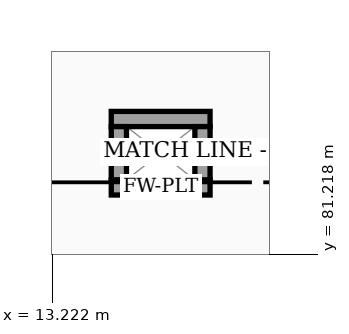
"""IFC4 building model, lengths in metres.
Left out: names, types, materials, properties, quantities, classifications, styles, units other than length and angle.
Written with IfcOpenShell. Run it as: python <this file> out.ifc"""

import sys

from ifc_helpers import new_model, si_unit, direction, frame, frame_2d, origin, place, context, subcontext, project, spatial, rectangle, extrude, element, save


model = new_model("IFC4")
c1 = context("Model", 3, precision=1e-05, world=origin(), true_north=direction((0.0, 1.0)))
c2 = subcontext(c1, "Body", "Model", "MODEL_VIEW")
j1 = project(units=[si_unit("LENGTHUNIT", "METRE"), si_unit("PLANEANGLEUNIT", "RADIAN")], contexts=[c1])
p1 = place(None, origin())
s1 = spatial("IfcSite", under=j1, at=p1, CompositionType="ELEMENT")
p2 = place(p1, origin())
s2 = spatial("IfcBuilding", under=s1, at=p2, CompositionType="ELEMENT")
p3 = place(p2, frame((0.0, 0.0, 8.4)))
s3 = spatial("IfcBuildingStorey", under=s2, at=p3, CompositionType="ELEMENT", Elevation=8.4)
for number, where, z_axis, x_axis in (
    (1, (15.3, 82.1, 0.0), (0.0, 0.0, 1.0), (-1.0, 0.0, 0.0)),
    (2, (14.0, 83.0, 0.0), (0.0, 0.0, 1.0), (1.0, 0.0, 0.0)),
):
    element("IfcWall", number, at=place(p3, frame(where, z_axis=z_axis, x_axis=x_axis)), inside=s3, PredefinedType="PARTITIONING", context=c2, shape_type="SweptSolid", body=[
        extrude(rectangle(XDim=1.3, YDim=0.2, at=frame_2d((0.65, 0.0))), origin(), (0.0, 0.0, 1.0), 3.65),
    ])
for number, where, z_axis, x_axis in (
    (3, (14.1, 82.2, 0.0), (0.0, 0.0, 1.0), (0.0, 1.0, 0.0)),
    (4, (15.2, 82.9, 0.0), (0.0, 0.0, 1.0), (0.0, -1.0, 0.0)),
):
    element("IfcWall", number, at=place(p3, frame(where, z_axis=z_axis, x_axis=x_axis)), inside=s3, PredefinedType="PARTITIONING", context=c2, shape_type="SweptSolid", body=[
        extrude(rectangle(XDim=0.7, YDim=0.2, at=frame_2d((0.35, 0.0))), origin(), (0.0, 0.0, 1.0), 3.65),
    ])
save(model, sys.argv[1])
